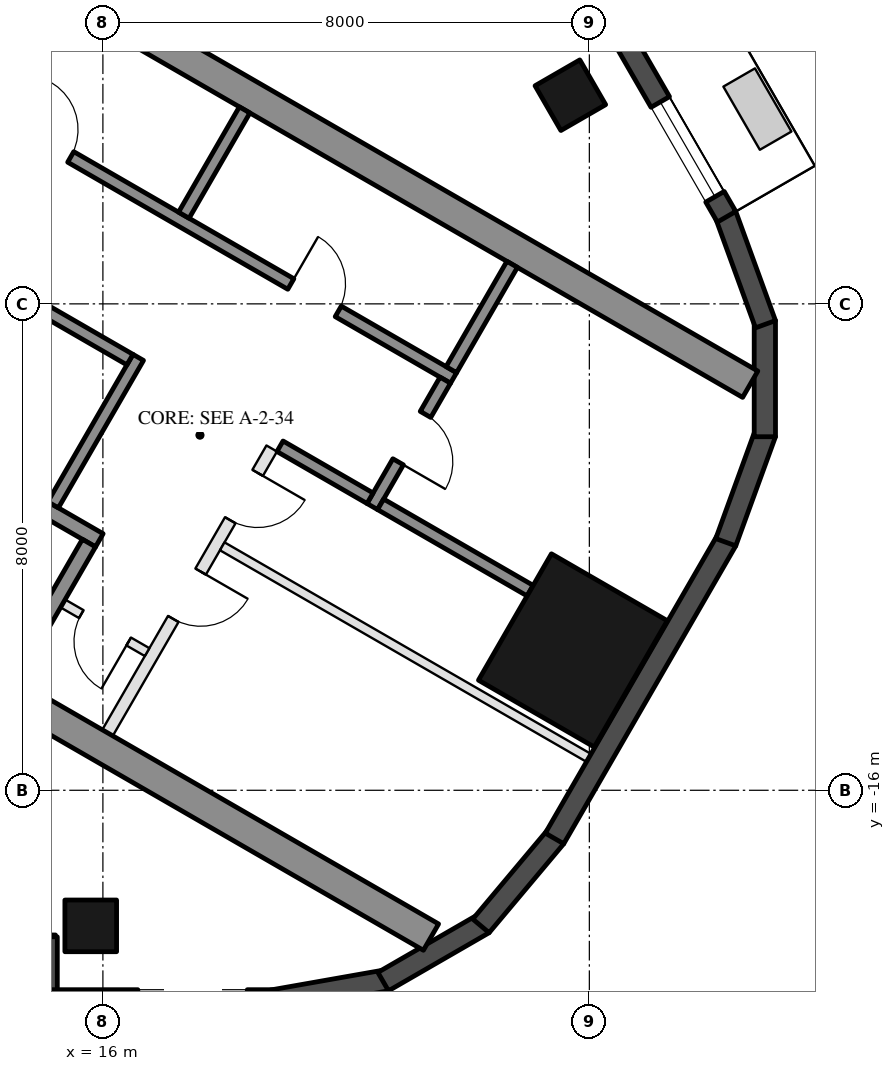
"""IFC4 building model, lengths in metres.
Left out: names, types, materials, properties, quantities, classifications, styles, units other than length and angle.
Written with IfcOpenShell. Run it as: python <this file> out.ifc"""

import sys

from ifc_helpers import new_model, si_unit, direction, frame, frame_2d, origin, origin_2d, place, context, subcontext, project, spatial, rectangle, hollow_rectangle, extrude, element, fill, save


model = new_model("IFC4")
c1 = context("Model", 3, precision=1e-05, world=origin(), true_north=direction((0.0, 1.0)))
c2 = subcontext(c1, "Body", "Model", "MODEL_VIEW")
j1 = project(units=[si_unit("LENGTHUNIT", "METRE"), si_unit("PLANEANGLEUNIT", "RADIAN")], contexts=[c1])
p1 = place(None, origin())
s1 = spatial("IfcSite", under=j1, at=p1, CompositionType="ELEMENT")
p2 = place(p1, origin())
s2 = spatial("IfcBuilding", under=s1, at=p2, CompositionType="ELEMENT")
p3 = place(p2, frame((0.0, 0.0, 150.3)))
s3 = spatial("IfcBuildingStorey", under=s2, at=p3, CompositionType="ELEMENT", Elevation=150.3)
for number, where, z_axis, x_axis in (
    (1, (15.8, -18.23, 0.0), (0.0, 0.0, 1.0), (-1.0, 0.0, 0.0)),
    (2, (23.688, -4.568, 0.0), (0.0, 0.0, 1.0), (-0.5, 0.866, 0.0)),
):
    element("IfcColumn", number, at=place(p3, frame(where, z_axis=z_axis, x_axis=x_axis)), inside=s3, PredefinedType="COLUMN", context=c2, shape_type="SweptSolid", body=[
        extrude(hollow_rectangle(XDim=0.85, YDim=0.85, WallThickness=0.04, at=origin_2d()), origin(), (0.0, 0.0, 1.0), 3.7),
    ])
p4 = place(p3, frame((23.729, -13.7, 0.0), z_axis=(0.0, 0.0, 1.0), x_axis=(0.5, 0.866025403784, 0.0)))
e3 = element("IfcColumn", 3, at=p4, inside=s3, PredefinedType="COLUMN", context=c2, shape_type="SweptSolid", body=[
    extrude(hollow_rectangle(XDim=2.4, YDim=2.2, WallThickness=0.06, at=origin_2d()), origin(), (0.0, 0.0, 1.0), 3.7),
])
p5 = place(p3, frame((8.48, -18.555, 0.0), z_axis=(0.0, 0.0, 1.0), x_axis=(1.0, 0.0, 0.0)))
e4 = element("IfcWall", 4, at=p5, inside=s3, PredefinedType="SOLIDWALL", context=c2, shape_type="SweptSolid", body=[
    extrude(rectangle(XDim=6.74, YDim=0.35, at=frame_2d((3.37, 0.0))), origin(), (0.0, 0.0, 1.0), 3.55),
])
p6 = place(p5, frame((0.32, 0.0, 0.0)))
e5 = element("IfcOpeningElement", 5, at=p6, cuts=e4, PredefinedType="OPENING", context=c2, shape_type="SweptSolid", body=[
    extrude(rectangle(XDim=2.4, YDim=2.4, at=frame_2d((1.2, 1.2))), frame((0.0, 0.185, 0.0), z_axis=(0.0, -1.0, 0.0), x_axis=(1.0, 0.0, 0.0)), (0.0, 0.0, 1.0), 0.37),
])
p7 = place(p5, frame((3.02, 0.0, 0.3)))
e6 = element("IfcOpeningElement", 6, at=p7, cuts=e4, PredefinedType="OPENING", context=c2, shape_type="SweptSolid", body=[
    extrude(rectangle(XDim=2.9, YDim=2.65, at=frame_2d((1.45, 1.325))), frame((0.0, 0.185, 0.0), z_axis=(0.0, -1.0, 0.0), x_axis=(1.0, 0.0, 0.0)), (0.0, 0.0, 1.0), 0.37),
])
p8 = place(p3, frame((15.075, -18.41, 0.0), z_axis=(0.0, 0.0, 1.0), x_axis=(0.0, -1.0, 0.0)))
e7 = element("IfcWall", 7, at=p8, inside=s3, PredefinedType="SOLIDWALL", context=c2, shape_type="SweptSolid", body=[
    extrude(rectangle(XDim=1.22, YDim=0.35, at=frame_2d((0.61, 0.0))), origin(), (0.0, 0.0, 1.0), 3.55),
])
p9 = place(p3, frame((14.9, -19.455, 0.0), z_axis=(0.0, 0.0, 1.0), x_axis=(1.0, 0.0, 0.0)))
e8 = element("IfcWall", 8, at=p9, inside=s3, PredefinedType="SOLIDWALL", context=c2, shape_type="SweptSolid", body=[
    extrude(rectangle(XDim=3.916, YDim=0.35, at=frame_2d((1.958, 0.0))), origin(), (0.0, 0.0, 1.0), 3.55),
])
p10 = place(p9, frame((1.675, 0.0, 0.3)))
e9 = element("IfcOpeningElement", 9, at=p10, cuts=e8, PredefinedType="OPENING", context=c2, shape_type="SweptSolid", body=[
    extrude(rectangle(XDim=1.8, YDim=2.65, at=frame_2d((0.9, 1.325))), frame((0.0, 0.185, 0.0), z_axis=(0.0, -1.0, 0.0), x_axis=(1.0, 0.0, 0.0)), (0.0, 0.0, 1.0), 0.37),
])
p11 = place(p3, frame((18.785, -19.458, 0.0), z_axis=(0.0, 0.0, 1.0), x_axis=(0.984798995425, 0.173697837091, 0.0)))
e10 = element("IfcWall", 10, at=p11, inside=s3, PredefinedType="SOLIDWALL", context=c2, shape_type="SweptSolid", body=[
    extrude(rectangle(XDim=1.91, YDim=0.35, at=frame_2d((0.955, 0.0))), origin(), (0.0, 0.0, 1.0), 3.55),
])
for number, where, z_axis, x_axis in (
    (11, (20.61, -19.147, 0.0), (0.0, 0.0, 1.0), (0.866, 0.5, 0.0)),
    (12, (22.217, -18.231, 0.0), (0.0, 0.0, 1.0), (0.643, 0.766, 0.0)),
):
    element("IfcWall", number, at=place(p3, frame(where, z_axis=z_axis, x_axis=x_axis)), inside=s3, PredefinedType="SOLIDWALL", context=c2, shape_type="SweptSolid", body=[
        extrude(rectangle(XDim=1.91, YDim=0.35, at=frame_2d((0.955, 0.0))), origin(), (0.0, 0.0, 1.0), 3.55),
    ])
p12 = place(p3, frame((23.427, -16.792, 0.0), z_axis=(0.0, 0.0, 1.0), x_axis=(0.500018773155, 0.866014564827, 0.0)))
e13 = element("IfcWall", 13, at=p12, inside=s3, PredefinedType="SOLIDWALL", context=c2, shape_type="SweptSolid", body=[
    extrude(rectangle(XDim=5.658, YDim=0.35, at=frame_2d((2.829, 0.0))), origin(), (0.0, 0.0, 1.0), 3.55),
])
for number, where, z_axis, x_axis in (
    (14, (26.244, -11.92, 0.0), (0.0, 0.0, 1.0), (0.342, 0.94, 0.0)),
    (15, (26.886, -10.185, 0.0), (0.0, 0.0, 1.0), (0.0, 1.0, 0.0)),
    (16, (26.897, -8.335, 0.0), (0.0, 0.0, 1.0), (-0.342, 0.94, 0.0)),
):
    element("IfcWall", number, at=place(p3, frame(where, z_axis=z_axis, x_axis=x_axis)), inside=s3, PredefinedType="SOLIDWALL", context=c2, shape_type="SweptSolid", body=[
        extrude(rectangle(XDim=1.91, YDim=0.35, at=frame_2d((0.955, 0.0))), origin(), (0.0, 0.0, 1.0), 3.55),
    ])
p13 = place(p3, frame((26.257, -6.567, 0.0), z_axis=(0.0, 0.0, 1.0), x_axis=(-0.500023526245, 0.866011820475, 0.0)))
e17 = element("IfcWall", 17, at=p13, inside=s3, PredefinedType="SOLIDWALL", context=c2, shape_type="SweptSolid", body=[
    extrude(rectangle(XDim=11.816, YDim=0.35, at=frame_2d((5.908, 0.0))), origin(), (0.0, 0.0, 1.0), 3.55),
])
p14 = place(p13, frame((0.38, 0.0, 0.3)))
e18 = element("IfcOpeningElement", 18, at=p14, cuts=e17, PredefinedType="OPENING", context=c2, shape_type="SweptSolid", body=[
    extrude(rectangle(XDim=1.8, YDim=2.65, at=frame_2d((0.9, 1.325))), frame((0.0, 0.185, 0.0), z_axis=(0.0, -1.0, 0.0), x_axis=(1.0, 0.0, 0.0)), (0.0, 0.0, 1.0), 0.37),
])
p15 = place(p13, frame((7.741, 0.0, 0.0)))
e19 = element("IfcOpeningElement", 19, at=p15, cuts=e17, PredefinedType="OPENING", context=c2, shape_type="SweptSolid", body=[
    extrude(rectangle(XDim=2.4, YDim=2.4, at=frame_2d((1.2, 1.2))), frame((0.0, 0.185, 0.0), z_axis=(0.0, -1.0, 0.0), x_axis=(1.0, 0.0, 0.0)), (0.0, 0.0, 1.0), 0.37),
])
p16 = place(p13, frame((3.791, 0.0, 0.3)))
e20 = element("IfcOpeningElement", 20, at=p16, cuts=e17, PredefinedType="OPENING", context=c2, shape_type="SweptSolid", body=[
    extrude(rectangle(XDim=1.6, YDim=2.65, at=frame_2d((0.8, 1.325))), frame((0.0, 0.185, 0.0), z_axis=(0.0, -1.0, 0.0), x_axis=(1.0, 0.0, 0.0)), (0.0, 0.0, 1.0), 0.37),
])
p17 = place(p13, frame((5.691, 0.0, 0.3)))
e21 = element("IfcOpeningElement", 21, at=p17, cuts=e17, PredefinedType="OPENING", context=c2, shape_type="SweptSolid", body=[
    extrude(rectangle(XDim=1.6, YDim=2.65, at=frame_2d((0.8, 1.325))), frame((0.0, 0.185, 0.0), z_axis=(0.0, -1.0, 0.0), x_axis=(1.0, 0.0, 0.0)), (0.0, 0.0, 1.0), 0.37),
])
for number, where, z_axis, x_axis in (
    (22, (8.547, -10.997, 0.0), (0.0, 0.0, 1.0), (0.866, -0.5, 0.0)),
    (23, (13.797, -1.903, 0.0), (0.0, 0.0, 1.0), (0.866, -0.5, 0.0)),
):
    element("IfcWall", number, at=place(p3, frame(where, z_axis=z_axis, x_axis=x_axis)), inside=s3, PredefinedType="SHEAR", context=c2, shape_type="SweptSolid", body=[
        extrude(rectangle(XDim=14.837, YDim=0.5, at=frame_2d((7.418, 0.0))), origin(), (0.0, 0.0, 1.0), 3.5),
    ])
p18 = place(p3, frame((10.356, -8.664, 0.0), z_axis=(0.0, 0.0, 1.0), x_axis=(0.866028629588, -0.499994412703, 0.0)))
e24 = element("IfcWall", 24, at=p18, inside=s3, PredefinedType="SHEAR", context=c2, shape_type="SweptSolid", body=[
    extrude(rectangle(XDim=6.45, YDim=0.25, at=frame_2d((3.225, 0.0))), origin(), (0.0, 0.0, 1.0), 3.5),
])
p19 = place(p18, frame((0.3, 0.0, 0.0)))
e25 = element("IfcOpeningElement", 25, at=p19, cuts=e24, PredefinedType="OPENING", context=c2, shape_type="SweptSolid", body=[
    extrude(rectangle(XDim=1.0, YDim=2.1, at=frame_2d((0.5, 1.05))), frame((0.0, 0.135, 0.0), z_axis=(0.0, -1.0, 0.0), x_axis=(1.0, 0.0, 0.0)), (0.0, 0.0, 1.0), 0.27),
])
p20 = place(p3, frame((14.496, -14.143, 0.0), z_axis=(0.0, 0.0, 1.0), x_axis=(0.500062241894, 0.865989465428, 0.0)))
e26 = element("IfcWall", 26, at=p20, inside=s3, PredefinedType="SHEAR", context=c2, shape_type="SweptSolid", body=[
    extrude(rectangle(XDim=2.55, YDim=0.25, at=frame_2d((1.275, 0.0))), origin(), (0.0, 0.0, 1.0), 3.5),
])
p21 = place(p3, frame((15.181, -11.305, 0.0), z_axis=(0.0, 0.0, 1.0), x_axis=(0.49994636267, 0.866056369097, 0.0)))
e27 = element("IfcWall", 27, at=p21, inside=s3, PredefinedType="SHEAR", context=c2, shape_type="SweptSolid", body=[
    extrude(rectangle(XDim=2.8, YDim=0.2, at=frame_2d((1.4, 0.0))), origin(), (0.0, 0.0, 1.0), 3.5),
])
p22 = place(p3, frame((14.02, -7.517, 0.0), z_axis=(0.0, 0.0, 1.0), x_axis=(0.866034573852, -0.49998411664, 0.0)))
e28 = element("IfcWall", 28, at=p22, inside=s3, PredefinedType="SHEAR", context=c2, shape_type="SweptSolid", body=[
    extrude(rectangle(XDim=2.8, YDim=0.2, at=frame_2d((1.4, 0.0))), origin(), (0.0, 0.0, 1.0), 3.5),
])
p23 = place(p3, frame((12.968, -4.138, 0.0), z_axis=(0.0, 0.0, 1.0), x_axis=(0.866028328073, -0.49999493495, 0.0)))
e29 = element("IfcWall", 29, at=p23, inside=s3, PredefinedType="SHEAR", context=c2, shape_type="SweptSolid", body=[
    extrude(rectangle(XDim=10.16, YDim=0.2, at=frame_2d((5.08, 0.0))), origin(), (0.0, 0.0, 1.0), 3.5),
])
p24 = place(p23, frame((1.99, 0.0, 0.0)))
e30 = element("IfcOpeningElement", 30, at=p24, cuts=e29, PredefinedType="OPENING", context=c2, shape_type="SweptSolid", body=[
    extrude(rectangle(XDim=0.9, YDim=2.1, at=frame_2d((0.45, 1.05))), frame((0.0, 0.11, 0.0), z_axis=(0.0, -1.0, 0.0), x_axis=(1.0, 0.0, 0.0)), (0.0, 0.0, 1.0), 0.22),
])
p25 = place(p23, frame((7.07, 0.0, 0.0)))
e31 = element("IfcOpeningElement", 31, at=p25, cuts=e29, PredefinedType="OPENING", context=c2, shape_type="SweptSolid", body=[
    extrude(rectangle(XDim=0.9, YDim=2.1, at=frame_2d((0.45, 1.05))), frame((0.0, 0.11, 0.0), z_axis=(0.0, -1.0, 0.0), x_axis=(1.0, 0.0, 0.0)), (0.0, 0.0, 1.0), 0.22),
])
p26 = place(p3, frame((20.43, -11.333, 0.0), z_axis=(0.0, 0.0, 1.0), x_axis=(0.500001309137, 0.866024647952, 0.0)))
e32 = element("IfcWall", 32, at=p26, inside=s3, PredefinedType="SHEAR", context=c2, shape_type="SweptSolid", body=[
    extrude(rectangle(XDim=2.4, YDim=0.2, at=frame_2d((1.2, 0.0))), origin(), (0.0, 0.0, 1.0), 3.5),
])
p27 = place(p26, frame((0.85, 0.0, 0.0)))
e33 = element("IfcOpeningElement", 33, at=p27, cuts=e32, PredefinedType="OPENING", context=c2, shape_type="SweptSolid", body=[
    extrude(rectangle(XDim=0.9, YDim=2.1, at=frame_2d((0.45, 1.05))), frame((0.0, 0.11, 0.0), z_axis=(0.0, -1.0, 0.0), x_axis=(1.0, 0.0, 0.0)), (0.0, 0.0, 1.0), 0.22),
])
p28 = place(p3, frame((18.913, -10.342, 0.0), z_axis=(0.0, 0.0, 1.0), x_axis=(0.866038183914, -0.499977863513, 0.0)))
e34 = element("IfcWall", 34, at=p28, inside=s3, PredefinedType="SHEAR", context=c2, shape_type="SweptSolid", body=[
    extrude(rectangle(XDim=1.71, YDim=0.2, at=frame_2d((0.855, 0.0))), origin(), (0.0, 0.0, 1.0), 3.5),
])
for number, where, z_axis, x_axis in (
    (35, (17.331, -6.542, 0.0), (0.0, 0.0, 1.0), (0.5, 0.866, 0.0)),
    (36, (21.73, -9.082, 0.0), (0.0, 0.0, 1.0), (0.5, 0.866, 0.0)),
):
    element("IfcWall", number, at=place(p3, frame(where, z_axis=z_axis, x_axis=x_axis)), inside=s3, PredefinedType="SHEAR", context=c2, shape_type="SweptSolid", body=[
        extrude(rectangle(XDim=2.0, YDim=0.2, at=frame_2d((1.0, 0.0))), origin(), (0.0, 0.0, 1.0), 3.5),
    ])
p29 = place(p3, frame((20.567, -11.297, 0.0), z_axis=(0.0, 0.0, 1.0), x_axis=(0.866055327414, -0.49994816717, 0.0)))
e37 = element("IfcWall", 37, at=p29, inside=s3, PredefinedType="SHEAR", context=c2, shape_type="SweptSolid", body=[
    extrude(rectangle(XDim=2.84, YDim=0.2, at=frame_2d((1.42, 0.0))), origin(), (0.0, 0.0, 1.0), 3.5),
])
p30 = place(p3, frame((16.076, -15.055, 0.0), z_axis=(0.0, 0.0, 1.0), x_axis=(0.499995103361, 0.866028230842, 0.0)))
e38 = element("IfcWall", 38, at=p30, inside=s3, PredefinedType="PARTITIONING", context=c2, shape_type="SweptSolid", body=[
    extrude(rectangle(XDim=5.4, YDim=0.2, at=frame_2d((2.7, 0.0))), origin(), (0.0, 0.0, 1.0), 3.5),
])
p31 = place(p30, frame((2.163, 0.0, 0.0)))
e39 = element("IfcOpeningElement", 39, at=p31, cuts=e38, PredefinedType="OPENING", context=c2, shape_type="SweptSolid", body=[
    extrude(rectangle(XDim=0.9, YDim=2.1, at=frame_2d((0.45, 1.05))), frame((0.0, 0.11, 0.0), z_axis=(0.0, -1.0, 0.0), x_axis=(1.0, 0.0, 0.0)), (0.0, 0.0, 1.0), 0.22),
])
p32 = place(p30, frame((4.038, 0.0, 0.0)))
e40 = element("IfcOpeningElement", 40, at=p32, cuts=e38, PredefinedType="OPENING", context=c2, shape_type="SweptSolid", body=[
    extrude(rectangle(XDim=0.9, YDim=2.1, at=frame_2d((0.45, 1.05))), frame((0.0, 0.11, 0.0), z_axis=(0.0, -1.0, 0.0), x_axis=(1.0, 0.0, 0.0)), (0.0, 0.0, 1.0), 0.22),
])
p33 = place(p3, frame((15.342, -12.928, 0.0), z_axis=(0.0, 0.0, 1.0), x_axis=(0.865989903783, -0.500061482766, 0.0)))
e41 = element("IfcWall", 41, at=p33, inside=s3, PredefinedType="PARTITIONING", context=c2, shape_type="SweptSolid", body=[
    extrude(rectangle(XDim=1.6, YDim=0.15, at=frame_2d((0.8, 0.0))), origin(), (0.0, 0.0, 1.0), 3.5),
])
p34 = place(p33, frame((0.35, 0.0, 0.0)))
e42 = element("IfcOpeningElement", 42, at=p34, cuts=e41, PredefinedType="OPENING", context=c2, shape_type="SweptSolid", body=[
    extrude(rectangle(XDim=0.9, YDim=2.1, at=frame_2d((0.45, 1.05))), frame((0.0, 0.085, 0.0), z_axis=(0.0, -1.0, 0.0), x_axis=(1.0, 0.0, 0.0)), (0.0, 0.0, 1.0), 0.17),
])
p35 = place(p3, frame((17.963, -11.987, 0.0), z_axis=(0.0, 0.0, 1.0), x_axis=(0.866016523273, -0.500015381182, 0.0)))
e43 = element("IfcWall", 43, at=p35, inside=s3, PredefinedType="PARTITIONING", context=c2, shape_type="SweptSolid", body=[
    extrude(rectangle(XDim=6.95, YDim=0.15, at=frame_2d((3.475, 0.0))), origin(), (0.0, 0.0, 1.0), 3.5),
])
p36 = place(p14, origin())
e44 = element("IfcWindow", 44, at=p36, inside=s3, PartitioningType="SINGLE_PANEL", PredefinedType="WINDOW", context=c2, shape_type="SweptSolid", body=[
    extrude(rectangle(XDim=1.8, YDim=2.65, at=frame_2d((0.9, 1.325))), frame((0.0, 0.03, 0.0), z_axis=(0.0, -1.0, 0.0), x_axis=(1.0, 0.0, 0.0)), (0.0, 0.0, 1.0), 0.06),
])
fill(e18, e44)
p37 = place(p34, frame((0.9, 0.0, 0.0), z_axis=(0.0, 0.0, 1.0), x_axis=(-1.0, 0.0, 0.0)))
e45 = element("IfcDoor", 45, at=p37, inside=s3, OperationType="SINGLE_SWING_LEFT", PredefinedType="DOOR", context=c2, shape_type="SweptSolid", body=[
    extrude(rectangle(XDim=0.9, YDim=2.1, at=frame_2d((0.45, 1.05))), frame((0.0, 0.025, 0.0), z_axis=(0.0, -1.0, 0.0), x_axis=(1.0, 0.0, 0.0)), (0.0, 0.0, 1.0), 0.05),
])
fill(e42, e45)
p38 = place(p24, origin())
e46 = element("IfcDoor", 46, at=p38, inside=s3, OperationType="SINGLE_SWING_LEFT", PredefinedType="DOOR", context=c2, shape_type="SweptSolid", body=[
    extrude(rectangle(XDim=0.9, YDim=2.1, at=frame_2d((0.45, 1.05))), frame((0.0, 0.025, 0.0), z_axis=(0.0, -1.0, 0.0), x_axis=(1.0, 0.0, 0.0)), (0.0, 0.0, 1.0), 0.05),
])
fill(e30, e46)
p39 = place(p25, origin())
e47 = element("IfcDoor", 47, at=p39, inside=s3, OperationType="SINGLE_SWING_LEFT", PredefinedType="DOOR", context=c2, shape_type="SweptSolid", body=[
    extrude(rectangle(XDim=0.9, YDim=2.1, at=frame_2d((0.45, 1.05))), frame((0.0, 0.025, 0.0), z_axis=(0.0, -1.0, 0.0), x_axis=(1.0, 0.0, 0.0)), (0.0, 0.0, 1.0), 0.05),
])
fill(e31, e47)
p40 = place(p27, frame((0.9, 0.0, 0.0), z_axis=(0.0, 0.0, 1.0), x_axis=(-1.0, 0.0, 0.0)))
e48 = element("IfcDoor", 48, at=p40, inside=s3, OperationType="SINGLE_SWING_RIGHT", PredefinedType="DOOR", context=c2, shape_type="SweptSolid", body=[
    extrude(rectangle(XDim=0.9, YDim=2.1, at=frame_2d((0.45, 1.05))), frame((0.0, 0.025, 0.0), z_axis=(0.0, -1.0, 0.0), x_axis=(1.0, 0.0, 0.0)), (0.0, 0.0, 1.0), 0.05),
])
fill(e33, e48)
p41 = place(p31, frame((0.9, 0.0, 0.0), z_axis=(0.0, 0.0, 1.0), x_axis=(-1.0, 0.0, 0.0)))
e49 = element("IfcDoor", 49, at=p41, inside=s3, OperationType="SINGLE_SWING_LEFT", PredefinedType="DOOR", context=c2, shape_type="SweptSolid", body=[
    extrude(rectangle(XDim=0.9, YDim=2.1, at=frame_2d((0.45, 1.05))), frame((0.0, 0.025, 0.0), z_axis=(0.0, -1.0, 0.0), x_axis=(1.0, 0.0, 0.0)), (0.0, 0.0, 1.0), 0.05),
])
fill(e39, e49)
p42 = place(p32, frame((0.9, 0.0, 0.0), z_axis=(0.0, 0.0, 1.0), x_axis=(-1.0, 0.0, 0.0)))
e50 = element("IfcDoor", 50, at=p42, inside=s3, OperationType="SINGLE_SWING_LEFT", PredefinedType="DOOR", context=c2, shape_type="SweptSolid", body=[
    extrude(rectangle(XDim=0.9, YDim=2.1, at=frame_2d((0.45, 1.05))), frame((0.0, 0.025, 0.0), z_axis=(0.0, -1.0, 0.0), x_axis=(1.0, 0.0, 0.0)), (0.0, 0.0, 1.0), 0.05),
])
fill(e40, e50)
save(model, sys.argv[1])
